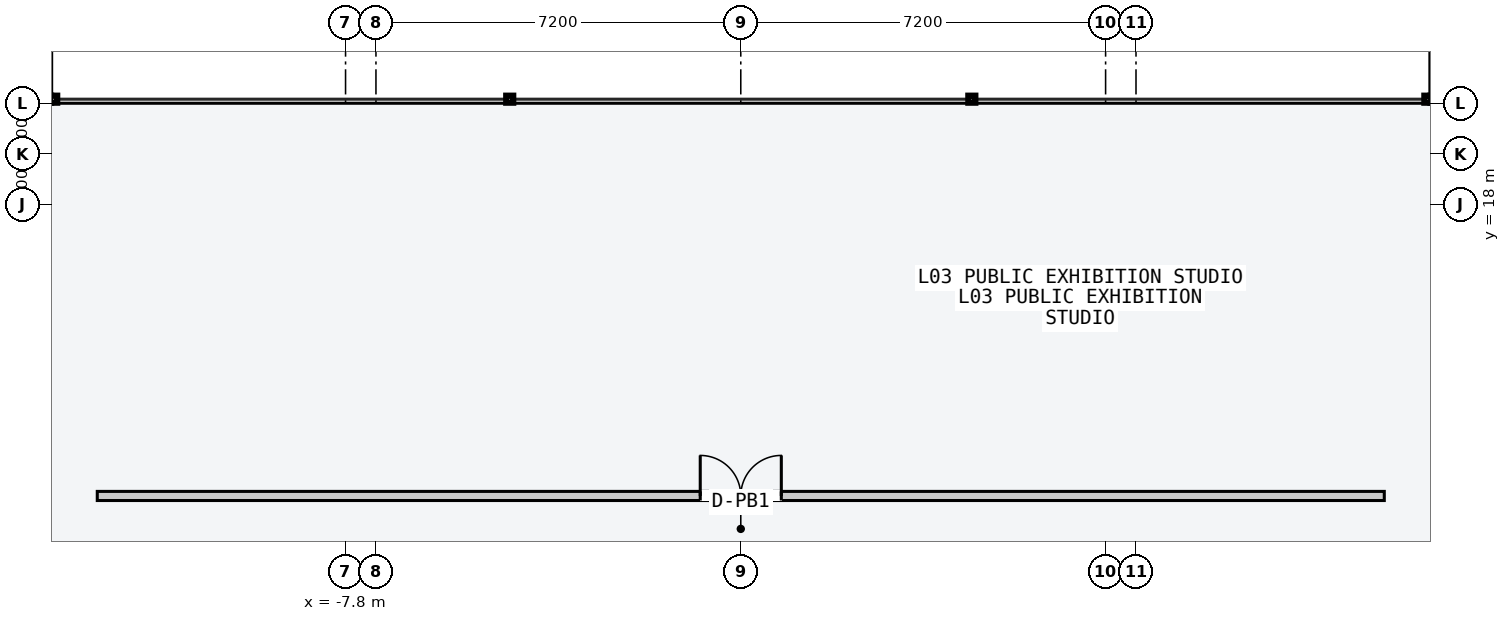
"""IFC4 building model, lengths in metres.
Left out: names, types, materials, properties, quantities, classifications, styles, units other than length and angle.
Written with IfcOpenShell. Run it as: python <this file> out.ifc"""

import sys

from ifc_helpers import new_model, si_unit, direction, frame, frame_2d, origin, place, context, subcontext, project, spatial, rectangle, extrude, element, fill, save


model = new_model("IFC4")
c1 = context("Model", 3, precision=1e-05, world=origin(), true_north=direction((0.0, 1.0)))
c2 = subcontext(c1, "Body", "Model", "MODEL_VIEW")
j1 = project(units=[si_unit("LENGTHUNIT", "METRE"), si_unit("PLANEANGLEUNIT", "RADIAN")], contexts=[c1])
p1 = place(None, origin())
s1 = spatial("IfcSite", under=j1, at=p1, CompositionType="ELEMENT")
p2 = place(p1, origin())
s2 = spatial("IfcBuilding", under=s1, at=p2, CompositionType="ELEMENT")
p3 = place(p2, frame((0.0, 0.0, 14.4)))
s3 = spatial("IfcBuildingStorey", under=s2, at=p3, CompositionType="ELEMENT", Elevation=14.4)
p4 = place(p3, frame((-12.7, 12.25, 0.0), z_axis=(0.0, 0.0, 1.0), x_axis=(1.0, 0.0, 0.0)))
e1 = element("IfcWall", 1, at=p4, inside=s3, PredefinedType="PARTITIONING", context=c2, shape_type="SweptSolid", body=[
    extrude(rectangle(XDim=25.4, YDim=0.18, at=frame_2d((12.7, 0.0))), origin(), (0.0, 0.0, 1.0), 4.58),
])
p5 = place(p4, frame((11.9, 0.0, 0.0)))
e2 = element("IfcOpeningElement", 2, at=p5, cuts=e1, PredefinedType="OPENING", context=c2, shape_type="SweptSolid", body=[
    extrude(rectangle(XDim=1.6, YDim=2.3, at=frame_2d((0.8, 1.15))), frame((0.0, 0.1, 0.0), z_axis=(0.0, -1.0, 0.0), x_axis=(1.0, 0.0, 0.0)), (0.0, 0.0, 1.0), 0.2),
])
p6 = place(p5, origin())
e3 = element("IfcDoor", 3, at=p6, inside=s3, OperationType="DOUBLE_DOOR_SINGLE_SWING", PredefinedType="DOOR", context=c2, shape_type="SweptSolid", body=[
    extrude(rectangle(XDim=1.6, YDim=2.3, at=frame_2d((0.8, 1.15))), frame((0.0, 0.025, 0.0), z_axis=(0.0, -1.0, 0.0), x_axis=(1.0, 0.0, 0.0)), (0.0, 0.0, 1.0), 0.05),
])
fill(e2, e3)
save(model, sys.argv[1])
